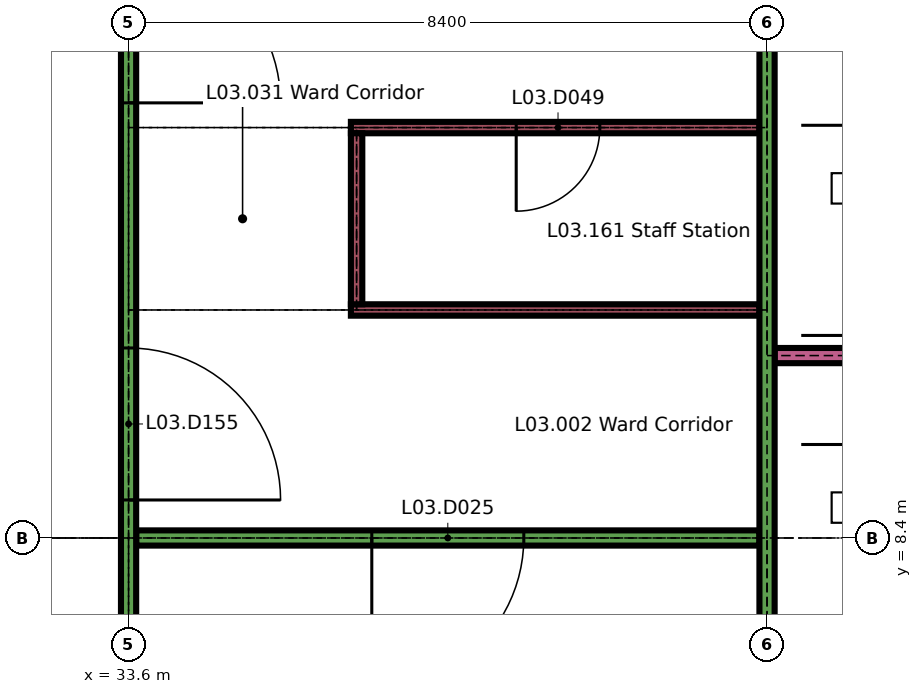
"""IFC4 building model, lengths in metres.
Left out: names, types, materials, properties, quantities, classifications, styles, units other than length and angle.
Written with IfcOpenShell. Run it as: python <this file> out.ifc"""

import sys

from ifc_helpers import new_model, si_unit, direction, frame, frame_2d, origin, place, context, subcontext, project, spatial, rectangle, extrude, element, fill, save


model = new_model("IFC4")
c1 = context("Model", 3, precision=1e-05, world=origin(), true_north=direction((0.0, 1.0)))
c2 = subcontext(c1, "Body", "Model", "MODEL_VIEW")
j1 = project(units=[si_unit("LENGTHUNIT", "METRE"), si_unit("PLANEANGLEUNIT", "RADIAN")], contexts=[c1])
p1 = place(None, origin())
s1 = spatial("IfcSite", under=j1, at=p1, CompositionType="ELEMENT")
p2 = place(p1, origin())
s2 = spatial("IfcBuilding", under=s1, at=p2, CompositionType="ELEMENT")
p3 = place(p2, frame((0.0, 0.0, 15.3)))
s3 = spatial("IfcBuildingStorey", under=s2, at=p3, CompositionType="ELEMENT", Elevation=15.3)
p4 = place(p3, frame((42.21, 8.4, 4.904), z_axis=(0.0, 0.0, 1.0), x_axis=(1.0, 0.0, 0.0)))
e1 = element("IfcWall", 1, at=p4, inside=s3, PredefinedType="SOLIDWALL", context=c2, shape_type="SweptSolid", body=[
    extrude(rectangle(XDim=58.38, YDim=0.2, at=frame_2d((29.19, 0.0))), origin(), (0.0, 0.0, 1.0), 2.539),
])
p5 = place(p4, frame((1.05, 0.0, 0.3)))
e2 = element("IfcOpeningElement", 2, at=p5, cuts=e1, PredefinedType="OPENING", context=c2, shape_type="SweptSolid", body=[
    extrude(rectangle(XDim=2.1, YDim=1.8, at=frame_2d((1.05, 0.9))), frame((0.0, 0.11, 0.0), z_axis=(0.0, -1.0, 0.0), x_axis=(1.0, 0.0, 0.0)), (0.0, 0.0, 1.0), 0.22),
])
p6 = place(p4, frame((5.25, 0.0, 0.3)))
e3 = element("IfcOpeningElement", 3, at=p6, cuts=e1, PredefinedType="OPENING", context=c2, shape_type="SweptSolid", body=[
    extrude(rectangle(XDim=2.1, YDim=1.8, at=frame_2d((1.05, 0.9))), frame((0.0, 0.11, 0.0), z_axis=(0.0, -1.0, 0.0), x_axis=(1.0, 0.0, 0.0)), (0.0, 0.0, 1.0), 0.22),
])
p7 = place(p4, frame((9.45, 0.0, 0.3)))
e4 = element("IfcOpeningElement", 4, at=p7, cuts=e1, PredefinedType="OPENING", context=c2, shape_type="SweptSolid", body=[
    extrude(rectangle(XDim=2.1, YDim=1.8, at=frame_2d((1.05, 0.9))), frame((0.0, 0.11, 0.0), z_axis=(0.0, -1.0, 0.0), x_axis=(1.0, 0.0, 0.0)), (0.0, 0.0, 1.0), 0.22),
])
p8 = place(p4, frame((13.65, 0.0, 0.3)))
e5 = element("IfcOpeningElement", 5, at=p8, cuts=e1, PredefinedType="OPENING", context=c2, shape_type="SweptSolid", body=[
    extrude(rectangle(XDim=2.1, YDim=1.8, at=frame_2d((1.05, 0.9))), frame((0.0, 0.11, 0.0), z_axis=(0.0, -1.0, 0.0), x_axis=(1.0, 0.0, 0.0)), (0.0, 0.0, 1.0), 0.22),
])
p9 = place(p4, frame((17.85, 0.0, 0.3)))
e6 = element("IfcOpeningElement", 6, at=p9, cuts=e1, PredefinedType="OPENING", context=c2, shape_type="SweptSolid", body=[
    extrude(rectangle(XDim=2.1, YDim=1.8, at=frame_2d((1.05, 0.9))), frame((0.0, 0.11, 0.0), z_axis=(0.0, -1.0, 0.0), x_axis=(1.0, 0.0, 0.0)), (0.0, 0.0, 1.0), 0.22),
])
p10 = place(p4, frame((22.05, 0.0, 0.3)))
e7 = element("IfcOpeningElement", 7, at=p10, cuts=e1, PredefinedType="OPENING", context=c2, shape_type="SweptSolid", body=[
    extrude(rectangle(XDim=2.1, YDim=1.8, at=frame_2d((1.05, 0.9))), frame((0.0, 0.11, 0.0), z_axis=(0.0, -1.0, 0.0), x_axis=(1.0, 0.0, 0.0)), (0.0, 0.0, 1.0), 0.22),
])
p11 = place(p4, frame((26.25, 0.0, 0.3)))
e8 = element("IfcOpeningElement", 8, at=p11, cuts=e1, PredefinedType="OPENING", context=c2, shape_type="SweptSolid", body=[
    extrude(rectangle(XDim=2.1, YDim=1.8, at=frame_2d((1.05, 0.9))), frame((0.0, 0.11, 0.0), z_axis=(0.0, -1.0, 0.0), x_axis=(1.0, 0.0, 0.0)), (0.0, 0.0, 1.0), 0.22),
])
p12 = place(p4, frame((30.45, 0.0, 0.3)))
e9 = element("IfcOpeningElement", 9, at=p12, cuts=e1, PredefinedType="OPENING", context=c2, shape_type="SweptSolid", body=[
    extrude(rectangle(XDim=2.1, YDim=1.8, at=frame_2d((1.05, 0.9))), frame((0.0, 0.11, 0.0), z_axis=(0.0, -1.0, 0.0), x_axis=(1.0, 0.0, 0.0)), (0.0, 0.0, 1.0), 0.22),
])
p13 = place(p4, frame((34.65, 0.0, 0.3)))
e10 = element("IfcOpeningElement", 10, at=p13, cuts=e1, PredefinedType="OPENING", context=c2, shape_type="SweptSolid", body=[
    extrude(rectangle(XDim=2.1, YDim=1.8, at=frame_2d((1.05, 0.9))), frame((0.0, 0.11, 0.0), z_axis=(0.0, -1.0, 0.0), x_axis=(1.0, 0.0, 0.0)), (0.0, 0.0, 1.0), 0.22),
])
p14 = place(p4, frame((38.85, 0.0, 0.3)))
e11 = element("IfcOpeningElement", 11, at=p14, cuts=e1, PredefinedType="OPENING", context=c2, shape_type="SweptSolid", body=[
    extrude(rectangle(XDim=2.1, YDim=1.8, at=frame_2d((1.05, 0.9))), frame((0.0, 0.11, 0.0), z_axis=(0.0, -1.0, 0.0), x_axis=(1.0, 0.0, 0.0)), (0.0, 0.0, 1.0), 0.22),
])
p15 = place(p4, frame((43.05, 0.0, 0.3)))
e12 = element("IfcOpeningElement", 12, at=p15, cuts=e1, PredefinedType="OPENING", context=c2, shape_type="SweptSolid", body=[
    extrude(rectangle(XDim=2.1, YDim=1.8, at=frame_2d((1.05, 0.9))), frame((0.0, 0.11, 0.0), z_axis=(0.0, -1.0, 0.0), x_axis=(1.0, 0.0, 0.0)), (0.0, 0.0, 1.0), 0.22),
])
p16 = place(p4, frame((47.25, 0.0, 0.3)))
e13 = element("IfcOpeningElement", 13, at=p16, cuts=e1, PredefinedType="OPENING", context=c2, shape_type="SweptSolid", body=[
    extrude(rectangle(XDim=2.1, YDim=1.8, at=frame_2d((1.05, 0.9))), frame((0.0, 0.11, 0.0), z_axis=(0.0, -1.0, 0.0), x_axis=(1.0, 0.0, 0.0)), (0.0, 0.0, 1.0), 0.22),
])
p17 = place(p4, frame((51.45, 0.0, 0.3)))
e14 = element("IfcOpeningElement", 14, at=p17, cuts=e1, PredefinedType="OPENING", context=c2, shape_type="SweptSolid", body=[
    extrude(rectangle(XDim=2.1, YDim=1.8, at=frame_2d((1.05, 0.9))), frame((0.0, 0.11, 0.0), z_axis=(0.0, -1.0, 0.0), x_axis=(1.0, 0.0, 0.0)), (0.0, 0.0, 1.0), 0.22),
])
p18 = place(p4, frame((55.65, 0.0, 0.3)))
e15 = element("IfcOpeningElement", 15, at=p18, cuts=e1, PredefinedType="OPENING", context=c2, shape_type="SweptSolid", body=[
    extrude(rectangle(XDim=2.1, YDim=1.8, at=frame_2d((1.05, 0.9))), frame((0.0, 0.11, 0.0), z_axis=(0.0, -1.0, 0.0), x_axis=(1.0, 0.0, 0.0)), (0.0, 0.0, 1.0), 0.22),
])
p19 = place(p3, frame((42.21, 12.6, 4.904), z_axis=(0.0, 0.0, 1.0), x_axis=(1.0, 0.0, 0.0)))
e16 = element("IfcWall", 16, at=p19, inside=s3, PredefinedType="SOLIDWALL", context=c2, shape_type="SweptSolid", body=[
    extrude(rectangle(XDim=58.38, YDim=0.2, at=frame_2d((29.19, 0.0))), origin(), (0.0, 0.0, 1.0), 2.539),
])
p20 = place(p19, frame((1.05, 0.0, 0.3)))
e17 = element("IfcOpeningElement", 17, at=p20, cuts=e16, PredefinedType="OPENING", context=c2, shape_type="SweptSolid", body=[
    extrude(rectangle(XDim=2.1, YDim=1.8, at=frame_2d((1.05, 0.9))), frame((0.0, 0.11, 0.0), z_axis=(0.0, -1.0, 0.0), x_axis=(1.0, 0.0, 0.0)), (0.0, 0.0, 1.0), 0.22),
])
p21 = place(p19, frame((5.25, 0.0, 0.3)))
e18 = element("IfcOpeningElement", 18, at=p21, cuts=e16, PredefinedType="OPENING", context=c2, shape_type="SweptSolid", body=[
    extrude(rectangle(XDim=2.1, YDim=1.8, at=frame_2d((1.05, 0.9))), frame((0.0, 0.11, 0.0), z_axis=(0.0, -1.0, 0.0), x_axis=(1.0, 0.0, 0.0)), (0.0, 0.0, 1.0), 0.22),
])
p22 = place(p19, frame((9.45, 0.0, 0.3)))
e19 = element("IfcOpeningElement", 19, at=p22, cuts=e16, PredefinedType="OPENING", context=c2, shape_type="SweptSolid", body=[
    extrude(rectangle(XDim=2.1, YDim=1.8, at=frame_2d((1.05, 0.9))), frame((0.0, 0.11, 0.0), z_axis=(0.0, -1.0, 0.0), x_axis=(1.0, 0.0, 0.0)), (0.0, 0.0, 1.0), 0.22),
])
p23 = place(p19, frame((13.65, 0.0, 0.3)))
e20 = element("IfcOpeningElement", 20, at=p23, cuts=e16, PredefinedType="OPENING", context=c2, shape_type="SweptSolid", body=[
    extrude(rectangle(XDim=2.1, YDim=1.8, at=frame_2d((1.05, 0.9))), frame((0.0, 0.11, 0.0), z_axis=(0.0, -1.0, 0.0), x_axis=(1.0, 0.0, 0.0)), (0.0, 0.0, 1.0), 0.22),
])
p24 = place(p19, frame((17.85, 0.0, 0.3)))
e21 = element("IfcOpeningElement", 21, at=p24, cuts=e16, PredefinedType="OPENING", context=c2, shape_type="SweptSolid", body=[
    extrude(rectangle(XDim=2.1, YDim=1.8, at=frame_2d((1.05, 0.9))), frame((0.0, 0.11, 0.0), z_axis=(0.0, -1.0, 0.0), x_axis=(1.0, 0.0, 0.0)), (0.0, 0.0, 1.0), 0.22),
])
p25 = place(p19, frame((22.05, 0.0, 0.3)))
e22 = element("IfcOpeningElement", 22, at=p25, cuts=e16, PredefinedType="OPENING", context=c2, shape_type="SweptSolid", body=[
    extrude(rectangle(XDim=2.1, YDim=1.8, at=frame_2d((1.05, 0.9))), frame((0.0, 0.11, 0.0), z_axis=(0.0, -1.0, 0.0), x_axis=(1.0, 0.0, 0.0)), (0.0, 0.0, 1.0), 0.22),
])
p26 = place(p19, frame((26.25, 0.0, 0.3)))
e23 = element("IfcOpeningElement", 23, at=p26, cuts=e16, PredefinedType="OPENING", context=c2, shape_type="SweptSolid", body=[
    extrude(rectangle(XDim=2.1, YDim=1.8, at=frame_2d((1.05, 0.9))), frame((0.0, 0.11, 0.0), z_axis=(0.0, -1.0, 0.0), x_axis=(1.0, 0.0, 0.0)), (0.0, 0.0, 1.0), 0.22),
])
p27 = place(p19, frame((30.45, 0.0, 0.3)))
e24 = element("IfcOpeningElement", 24, at=p27, cuts=e16, PredefinedType="OPENING", context=c2, shape_type="SweptSolid", body=[
    extrude(rectangle(XDim=2.1, YDim=1.8, at=frame_2d((1.05, 0.9))), frame((0.0, 0.11, 0.0), z_axis=(0.0, -1.0, 0.0), x_axis=(1.0, 0.0, 0.0)), (0.0, 0.0, 1.0), 0.22),
])
p28 = place(p19, frame((34.65, 0.0, 0.3)))
e25 = element("IfcOpeningElement", 25, at=p28, cuts=e16, PredefinedType="OPENING", context=c2, shape_type="SweptSolid", body=[
    extrude(rectangle(XDim=2.1, YDim=1.8, at=frame_2d((1.05, 0.9))), frame((0.0, 0.11, 0.0), z_axis=(0.0, -1.0, 0.0), x_axis=(1.0, 0.0, 0.0)), (0.0, 0.0, 1.0), 0.22),
])
p29 = place(p19, frame((38.85, 0.0, 0.3)))
e26 = element("IfcOpeningElement", 26, at=p29, cuts=e16, PredefinedType="OPENING", context=c2, shape_type="SweptSolid", body=[
    extrude(rectangle(XDim=2.1, YDim=1.8, at=frame_2d((1.05, 0.9))), frame((0.0, 0.11, 0.0), z_axis=(0.0, -1.0, 0.0), x_axis=(1.0, 0.0, 0.0)), (0.0, 0.0, 1.0), 0.22),
])
p30 = place(p19, frame((43.05, 0.0, 0.3)))
e27 = element("IfcOpeningElement", 27, at=p30, cuts=e16, PredefinedType="OPENING", context=c2, shape_type="SweptSolid", body=[
    extrude(rectangle(XDim=2.1, YDim=1.8, at=frame_2d((1.05, 0.9))), frame((0.0, 0.11, 0.0), z_axis=(0.0, -1.0, 0.0), x_axis=(1.0, 0.0, 0.0)), (0.0, 0.0, 1.0), 0.22),
])
p31 = place(p19, frame((47.25, 0.0, 0.3)))
e28 = element("IfcOpeningElement", 28, at=p31, cuts=e16, PredefinedType="OPENING", context=c2, shape_type="SweptSolid", body=[
    extrude(rectangle(XDim=2.1, YDim=1.8, at=frame_2d((1.05, 0.9))), frame((0.0, 0.11, 0.0), z_axis=(0.0, -1.0, 0.0), x_axis=(1.0, 0.0, 0.0)), (0.0, 0.0, 1.0), 0.22),
])
p32 = place(p19, frame((51.45, 0.0, 0.3)))
e29 = element("IfcOpeningElement", 29, at=p32, cuts=e16, PredefinedType="OPENING", context=c2, shape_type="SweptSolid", body=[
    extrude(rectangle(XDim=2.1, YDim=1.8, at=frame_2d((1.05, 0.9))), frame((0.0, 0.11, 0.0), z_axis=(0.0, -1.0, 0.0), x_axis=(1.0, 0.0, 0.0)), (0.0, 0.0, 1.0), 0.22),
])
p33 = place(p19, frame((55.65, 0.0, 0.3)))
e30 = element("IfcOpeningElement", 30, at=p33, cuts=e16, PredefinedType="OPENING", context=c2, shape_type="SweptSolid", body=[
    extrude(rectangle(XDim=2.1, YDim=1.8, at=frame_2d((1.05, 0.9))), frame((0.0, 0.11, 0.0), z_axis=(0.0, -1.0, 0.0), x_axis=(1.0, 0.0, 0.0)), (0.0, 0.0, 1.0), 0.22),
])
p34 = place(p3, frame((33.7, 8.4, 0.0), z_axis=(0.0, 0.0, 1.0), x_axis=(1.0, 0.0, 0.0)))
e31 = element("IfcWall", 31, at=p34, inside=s3, PredefinedType="PARTITIONING", context=c2, shape_type="SweptSolid", body=[
    extrude(rectangle(XDim=8.2, YDim=0.2, at=frame_2d((4.1, 0.0))), origin(), (0.0, 0.0, 1.0), 3.26),
])
p35 = place(p34, frame((3.1, 0.0, 0.0)))
e32 = element("IfcOpeningElement", 32, at=p35, cuts=e31, PredefinedType="OPENING", context=c2, shape_type="SweptSolid", body=[
    extrude(rectangle(XDim=2.0, YDim=2.4, at=frame_2d((1.0, 1.2))), frame((0.0, 0.11, 0.0), z_axis=(0.0, -1.0, 0.0), x_axis=(1.0, 0.0, 0.0)), (0.0, 0.0, 1.0), 0.22),
])
p36 = place(p3, frame((42.1, 10.8, 0.0), z_axis=(0.0, 0.0, 1.0), x_axis=(1.0, 0.0, 0.0)))
e33 = element("IfcWall", 33, at=p36, inside=s3, PredefinedType="PARTITIONING", context=c2, shape_type="SweptSolid", body=[
    extrude(rectangle(XDim=58.575, YDim=0.2, at=frame_2d((29.288, 0.0))), origin(), (0.0, 0.0, 1.0), 4.0),
])
p37 = place(p36, frame((4.15, 0.0, 0.0)))
e34 = element("IfcOpeningElement", 34, at=p37, cuts=e33, PredefinedType="OPENING", context=c2, shape_type="SweptSolid", body=[
    extrude(rectangle(XDim=1.4, YDim=2.1, at=frame_2d((0.7, 1.05))), frame((0.0, 0.11, 0.0), z_axis=(0.0, -1.0, 0.0), x_axis=(1.0, 0.0, 0.0)), (0.0, 0.0, 1.0), 0.22),
])
p38 = place(p36, frame((13.9, 0.0, 0.0)))
e35 = element("IfcOpeningElement", 35, at=p38, cuts=e33, PredefinedType="OPENING", context=c2, shape_type="SweptSolid", body=[
    extrude(rectangle(XDim=1.4, YDim=2.1, at=frame_2d((0.7, 1.05))), frame((0.0, 0.11, 0.0), z_axis=(0.0, -1.0, 0.0), x_axis=(1.0, 0.0, 0.0)), (0.0, 0.0, 1.0), 0.22),
])
p39 = place(p36, frame((23.3, 0.0, 0.0)))
e36 = element("IfcOpeningElement", 36, at=p39, cuts=e33, PredefinedType="OPENING", context=c2, shape_type="SweptSolid", body=[
    extrude(rectangle(XDim=1.4, YDim=2.1, at=frame_2d((0.7, 1.05))), frame((0.0, 0.11, 0.0), z_axis=(0.0, -1.0, 0.0), x_axis=(1.0, 0.0, 0.0)), (0.0, 0.0, 1.0), 0.22),
])
p40 = place(p36, frame((32.0, 0.0, 0.0)))
e37 = element("IfcOpeningElement", 37, at=p40, cuts=e33, PredefinedType="OPENING", context=c2, shape_type="SweptSolid", body=[
    extrude(rectangle(XDim=1.4, YDim=2.1, at=frame_2d((0.7, 1.05))), frame((0.0, 0.11, 0.0), z_axis=(0.0, -1.0, 0.0), x_axis=(1.0, 0.0, 0.0)), (0.0, 0.0, 1.0), 0.22),
])
p41 = place(p36, frame((40.4, 0.0, 0.0)))
e38 = element("IfcOpeningElement", 38, at=p41, cuts=e33, PredefinedType="OPENING", context=c2, shape_type="SweptSolid", body=[
    extrude(rectangle(XDim=1.4, YDim=2.1, at=frame_2d((0.7, 1.05))), frame((0.0, 0.11, 0.0), z_axis=(0.0, -1.0, 0.0), x_axis=(1.0, 0.0, 0.0)), (0.0, 0.0, 1.0), 0.22),
])
p42 = place(p36, frame((48.1, 0.0, 0.0)))
e39 = element("IfcOpeningElement", 39, at=p42, cuts=e33, PredefinedType="OPENING", context=c2, shape_type="SweptSolid", body=[
    extrude(rectangle(XDim=1.4, YDim=2.1, at=frame_2d((0.7, 1.05))), frame((0.0, 0.11, 0.0), z_axis=(0.0, -1.0, 0.0), x_axis=(1.0, 0.0, 0.0)), (0.0, 0.0, 1.0), 0.22),
])
p43 = place(p36, frame((54.738, 0.0, 0.0)))
e40 = element("IfcOpeningElement", 40, at=p43, cuts=e33, PredefinedType="OPENING", context=c2, shape_type="SweptSolid", body=[
    extrude(rectangle(XDim=1.4, YDim=2.1, at=frame_2d((0.7, 1.05))), frame((0.0, 0.11, 0.0), z_axis=(0.0, -1.0, 0.0), x_axis=(1.0, 0.0, 0.0)), (0.0, 0.0, 1.0), 0.22),
])
p44 = place(p3, frame((36.525, 11.4, 0.0), z_axis=(0.0, 0.0, 1.0), x_axis=(1.0, 0.0, 0.0)))
e41 = element("IfcWall", 41, at=p44, inside=s3, PredefinedType="PARTITIONING", context=c2, shape_type="SweptSolid", body=[
    extrude(rectangle(XDim=5.375, YDim=0.15, at=frame_2d((2.688, 0.0))), origin(), (0.0, 0.0, 1.0), 3.26),
])
p45 = place(p3, frame((36.525, 13.8, 0.0), z_axis=(0.0, 0.0, 1.0), x_axis=(1.0, 0.0, 0.0)))
e42 = element("IfcWall", 42, at=p45, inside=s3, PredefinedType="PARTITIONING", context=c2, shape_type="SweptSolid", body=[
    extrude(rectangle(XDim=5.375, YDim=0.15, at=frame_2d((2.688, 0.0))), origin(), (0.0, 0.0, 1.0), 3.26),
])
p46 = place(p45, frame((2.175, 0.0, 0.0)))
e43 = element("IfcOpeningElement", 43, at=p46, cuts=e42, PredefinedType="OPENING", context=c2, shape_type="SweptSolid", body=[
    extrude(rectangle(XDim=1.1, YDim=2.1, at=frame_2d((0.55, 1.05))), frame((0.0, 0.085, 0.0), z_axis=(0.0, -1.0, 0.0), x_axis=(1.0, 0.0, 0.0)), (0.0, 0.0, 1.0), 0.17),
])
p47 = place(p3, frame((33.6, 3.6, 0.0), z_axis=(0.0, 0.0, 1.0), x_axis=(0.0, 1.0, 0.0)))
e44 = element("IfcWall", 44, at=p47, inside=s3, PredefinedType="PARTITIONING", context=c2, shape_type="SweptSolid", body=[
    extrude(rectangle(XDim=12.85, YDim=0.2, at=frame_2d((6.425, 0.0))), origin(), (0.0, 0.0, 1.0), 3.26),
])
p48 = place(p47, frame((5.3, 0.0, 0.0)))
e45 = element("IfcOpeningElement", 45, at=p48, cuts=e44, PredefinedType="OPENING", context=c2, shape_type="SweptSolid", body=[
    extrude(rectangle(XDim=2.0, YDim=2.4, at=frame_2d((1.0, 1.2))), frame((0.0, 0.11, 0.0), z_axis=(0.0, -1.0, 0.0), x_axis=(1.0, 0.0, 0.0)), (0.0, 0.0, 1.0), 0.22),
])
p49 = place(p47, frame((10.525, 0.0, 0.0)))
e46 = element("IfcOpeningElement", 46, at=p49, cuts=e44, PredefinedType="OPENING", context=c2, shape_type="SweptSolid", body=[
    extrude(rectangle(XDim=2.0, YDim=2.4, at=frame_2d((1.0, 1.2))), frame((0.0, 0.11, 0.0), z_axis=(0.0, -1.0, 0.0), x_axis=(1.0, 0.0, 0.0)), (0.0, 0.0, 1.0), 0.22),
])
p50 = place(p3, frame((36.6, 11.475, 0.0), z_axis=(0.0, 0.0, 1.0), x_axis=(0.0, 1.0, 0.0)))
e47 = element("IfcWall", 47, at=p50, inside=s3, PredefinedType="PARTITIONING", context=c2, shape_type="SweptSolid", body=[
    extrude(rectangle(XDim=2.25, YDim=0.15, at=frame_2d((1.125, 0.0))), origin(), (0.0, 0.0, 1.0), 3.26),
])
p51 = place(p3, frame((42.0, 3.6, 0.0), z_axis=(0.0, 0.0, 1.0), x_axis=(0.0, 1.0, 0.0)))
e48 = element("IfcWall", 48, at=p51, inside=s3, PredefinedType="PARTITIONING", context=c2, shape_type="SweptSolid", body=[
    extrude(rectangle(XDim=12.825, YDim=0.2, at=frame_2d((6.413, 0.0))), origin(), (0.0, 0.0, 1.0), 3.26),
])
p52 = place(p51, frame((1.5, 0.0, 0.0)))
e49 = element("IfcOpeningElement", 49, at=p52, cuts=e48, PredefinedType="OPENING", context=c2, shape_type="SweptSolid", body=[
    extrude(rectangle(XDim=1.8, YDim=2.4, at=frame_2d((0.9, 1.2))), frame((0.0, 0.11, 0.0), z_axis=(0.0, -1.0, 0.0), x_axis=(1.0, 0.0, 0.0)), (0.0, 0.0, 1.0), 0.22),
])
p53 = place(p35, origin())
e50 = element("IfcDoor", 50, at=p53, inside=s3, OperationType="SINGLE_SWING_LEFT", PredefinedType="DOOR", context=c2, shape_type="SweptSolid", body=[
    extrude(rectangle(XDim=2.0, YDim=2.4, at=frame_2d((1.0, 1.2))), frame((0.0, 0.03, 0.0), z_axis=(0.0, -1.0, 0.0), x_axis=(1.0, 0.0, 0.0)), (0.0, 0.0, 1.0), 0.06),
])
fill(e32, e50)
p54 = place(p46, origin())
e51 = element("IfcDoor", 51, at=p54, inside=s3, OperationType="SINGLE_SWING_LEFT", PredefinedType="DOOR", context=c2, shape_type="SweptSolid", body=[
    extrude(rectangle(XDim=1.1, YDim=2.1, at=frame_2d((0.55, 1.05))), frame((0.0, 0.025, 0.0), z_axis=(0.0, -1.0, 0.0), x_axis=(1.0, 0.0, 0.0)), (0.0, 0.0, 1.0), 0.05),
])
fill(e43, e51)
p55 = place(p48, origin())
e52 = element("IfcDoor", 52, at=p55, inside=s3, OperationType="SINGLE_SWING_LEFT", PredefinedType="DOOR", context=c2, shape_type="SweptSolid", body=[
    extrude(rectangle(XDim=2.0, YDim=2.4, at=frame_2d((1.0, 1.2))), frame((0.0, 0.03, 0.0), z_axis=(0.0, -1.0, 0.0), x_axis=(1.0, 0.0, 0.0)), (0.0, 0.0, 1.0), 0.06),
])
fill(e45, e52)
p56 = place(p49, origin())
e53 = element("IfcDoor", 53, at=p56, inside=s3, OperationType="SINGLE_SWING_LEFT", PredefinedType="DOOR", context=c2, shape_type="SweptSolid", body=[
    extrude(rectangle(XDim=2.0, YDim=2.4, at=frame_2d((1.0, 1.2))), frame((0.0, 0.03, 0.0), z_axis=(0.0, -1.0, 0.0), x_axis=(1.0, 0.0, 0.0)), (0.0, 0.0, 1.0), 0.06),
])
fill(e46, e53)
save(model, sys.argv[1])
